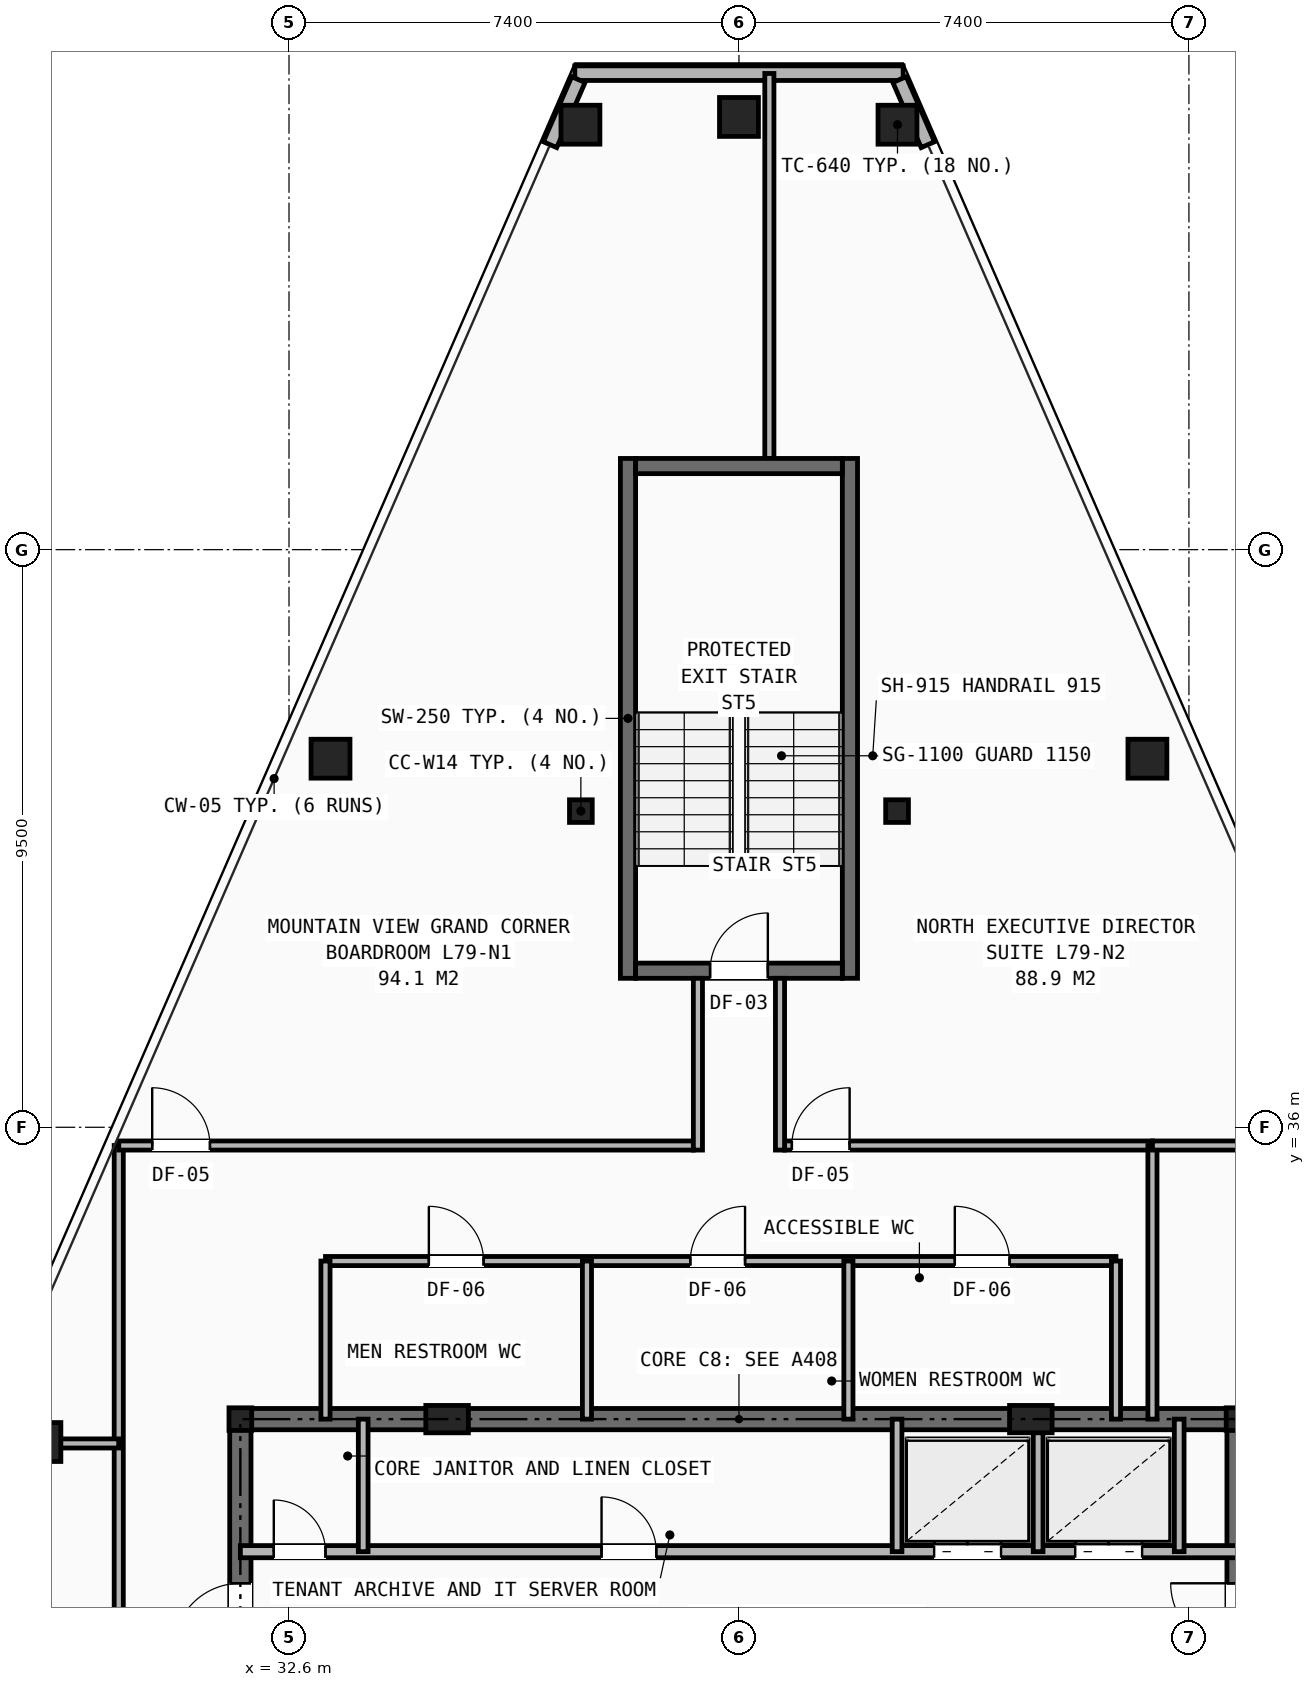
"""IFC4 building model, lengths in metres.
Left out: names, types, materials, properties, quantities, classifications, styles, units other than length and angle.
Written with IfcOpenShell. Run it as: python <this file> out.ifc"""

import sys

from ifc_helpers import new_model, si_unit, direction, frame, frame_2d, origin, origin_2d, place, context, subcontext, project, spatial, rectangle, hollow_rectangle, i_section, extrude, element, fill, save


model = new_model("IFC4")
c1 = context("Model", 3, precision=1e-05, world=origin(), true_north=direction((0.0, 1.0)))
c2 = subcontext(c1, "Body", "Model", "MODEL_VIEW")
j1 = project(units=[si_unit("LENGTHUNIT", "METRE"), si_unit("PLANEANGLEUNIT", "RADIAN")], contexts=[c1])
p1 = place(None, origin())
s1 = spatial("IfcSite", under=j1, at=p1, CompositionType="ELEMENT")
p2 = place(p1, origin())
s2 = spatial("IfcBuilding", under=s1, at=p2, CompositionType="ELEMENT")
p3 = place(p2, frame((0.0, 0.0, 279.5)))
s3 = spatial("IfcBuildingStorey", under=s2, at=p3, CompositionType="ELEMENT", Elevation=279.5)
for number, where, z_axis, x_axis in (
    (1, (31.8, 31.2, 0.0), (0.0, 0.0, 1.0), (1.0, 0.0, 0.0)),
    (2, (48.2, 31.2, 0.0), (0.0, 0.0, 1.0), (1.0, 0.0, 0.0)),
    (3, (37.4, 41.2, 0.0), (0.0, 0.0, 1.0), (1.0, 0.0, 0.0)),
    (4, (42.6, 41.2, 0.0), (0.0, 0.0, 1.0), (1.0, 0.0, 0.0)),
):
    element("IfcColumn", number, at=place(p3, frame(where, z_axis=z_axis, x_axis=x_axis)), inside=s3, PredefinedType="COLUMN", context=c2, shape_type="SweptSolid", body=[
        extrude(i_section(OverallWidth=0.374, OverallDepth=0.372, WebThickness=0.016, FlangeThickness=0.026, at=origin_2d()), origin(), (0.0, 0.0, 1.0), 3.5),
    ])
for number, where, z_axis, x_axis in (
    (5, (35.2, 31.2, 0.0), (0.0, 0.0, 1.0), (1.0, 0.0, 0.0)),
    (6, (44.8, 31.2, 0.0), (0.0, 0.0, 1.0), (1.0, 0.0, 0.0)),
):
    element("IfcColumn", number, at=place(p3, frame(where, z_axis=z_axis, x_axis=x_axis)), inside=s3, PredefinedType="PILASTER", context=c2, shape_type="SweptSolid", body=[
        extrude(rectangle(XDim=0.7, YDim=0.45, at=origin_2d()), origin(), (0.0, 0.0, 1.0), 3.5),
    ])
for number, where, z_axis, x_axis in (
    (7, (42.607, 52.489, 0.0), (0.0, 0.0, 1.0), (1.0, 0.0, 0.0)),
    (8, (40.0, 52.617, 0.0), (0.0, 0.0, 1.0), (1.0, 0.0, 0.0)),
    (9, (37.393, 52.489, 0.0), (0.0, 0.0, 1.0), (1.0, 0.0, 0.0)),
    (10, (33.283, 42.062, 0.0), (0.0, 0.0, 1.0), (1.0, 0.0, 0.0)),
    (11, (28.528, 30.823, 0.0), (0.0, 0.0, 1.0), (1.0, 0.0, 0.0)),
    (12, (46.717, 42.062, 0.0), (0.0, 0.0, 1.0), (1.0, 0.0, 0.0)),
):
    element("IfcColumn", number, at=place(p3, frame(where, z_axis=z_axis, x_axis=x_axis)), inside=s3, PredefinedType="COLUMN", context=c2, shape_type="SweptSolid", body=[
        extrude(hollow_rectangle(XDim=0.64, YDim=0.64, WallThickness=0.045, at=origin_2d()), origin(), (0.0, 0.0, 1.0), 3.5),
    ])
p4 = place(p3, frame((37.3, 53.337, 0.0), z_axis=(0.0, 0.0, 1.0), x_axis=(1.0, 0.0, 0.0)))
e13 = element("IfcWall", 13, at=p4, inside=s3, PredefinedType="SHEAR", context=c2, shape_type="SweptSolid", body=[
    extrude(rectangle(XDim=5.4, YDim=0.24, at=frame_2d((2.7, 0.0))), origin(), (0.0, 0.0, 1.0), 2.623),
])
for number, where, z_axis, x_axis in (
    (14, (37.359, 53.231, 0.0), (0.0, 0.0, 1.0), (-0.399, -0.917, 0.0)),
    (15, (43.107, 52.161, 0.0), (0.0, 0.0, 1.0), (-0.399, 0.917, 0.0)),
):
    element("IfcWall", number, at=place(p3, frame(where, z_axis=z_axis, x_axis=x_axis)), inside=s3, PredefinedType="SHEAR", context=c2, shape_type="SweptSolid", body=[
        extrude(rectangle(XDim=1.167, YDim=0.24, at=frame_2d((0.584, 0.0))), origin(), (0.0, 0.0, 1.0), 2.623),
    ])
p5 = place(p3, frame((31.8, 31.2, 0.0), z_axis=(0.0, 0.0, 1.0), x_axis=(1.0, 0.0, 0.0)))
e16 = element("IfcWall", 16, at=p5, inside=s3, PredefinedType="SHEAR", context=c2, shape_type="SweptSolid", body=[
    extrude(rectangle(XDim=16.4, YDim=0.35, at=frame_2d((8.2, 0.0))), origin(), (0.0, 0.0, 1.0), 3.25),
])
p6 = place(p3, frame((31.8, 16.4, 0.0), z_axis=(0.0, 0.0, 1.0), x_axis=(0.0, 1.0, 0.0)))
e17 = element("IfcWall", 17, at=p6, inside=s3, PredefinedType="SHEAR", context=c2, shape_type="SweptSolid", body=[
    extrude(rectangle(XDim=14.8, YDim=0.35, at=frame_2d((7.4, 0.0))), origin(), (0.0, 0.0, 1.0), 3.25),
])
p7 = place(p6, frame((11.0, 0.0, 0.0)))
e18 = element("IfcOpeningElement", 18, at=p7, cuts=e17, PredefinedType="OPENING", context=c2, shape_type="SweptSolid", body=[
    extrude(rectangle(XDim=1.1, YDim=2.15, at=frame_2d((0.55, 1.075))), frame((0.0, 0.185, 0.0), z_axis=(0.0, -1.0, 0.0), x_axis=(1.0, 0.0, 0.0)), (0.0, 0.0, 1.0), 0.37),
])
p8 = place(p3, frame((48.2, 16.4, 0.0), z_axis=(0.0, 0.0, 1.0), x_axis=(0.0, 1.0, 0.0)))
e19 = element("IfcWall", 19, at=p8, inside=s3, PredefinedType="SHEAR", context=c2, shape_type="SweptSolid", body=[
    extrude(rectangle(XDim=14.8, YDim=0.35, at=frame_2d((7.4, 0.0))), origin(), (0.0, 0.0, 1.0), 3.25),
])
p9 = place(p8, frame((11.0, 0.0, 0.0)))
e20 = element("IfcOpeningElement", 20, at=p9, cuts=e19, PredefinedType="OPENING", context=c2, shape_type="SweptSolid", body=[
    extrude(rectangle(XDim=1.1, YDim=2.15, at=frame_2d((0.55, 1.075))), frame((0.0, 0.185, 0.0), z_axis=(0.0, -1.0, 0.0), x_axis=(1.0, 0.0, 0.0)), (0.0, 0.0, 1.0), 0.37),
])
p10 = place(p3, frame((31.8, 29.02, 0.0), z_axis=(0.0, 0.0, 1.0), x_axis=(1.0, 0.0, 0.0)))
e21 = element("IfcWall", 21, at=p10, inside=s3, PredefinedType="SOLIDWALL", context=c2, shape_type="SweptSolid", body=[
    extrude(rectangle(XDim=16.4, YDim=0.2, at=frame_2d((8.2, 0.0))), origin(), (0.0, 0.0, 1.0), 2.705),
])
p11 = place(p10, frame((0.55, 0.0, 0.0)))
e22 = element("IfcOpeningElement", 22, at=p11, cuts=e21, PredefinedType="OPENING", context=c2, shape_type="SweptSolid", body=[
    extrude(rectangle(XDim=0.85, YDim=2.05, at=frame_2d((0.425, 1.025))), frame((0.0, 0.11, 0.0), z_axis=(0.0, -1.0, 0.0), x_axis=(1.0, 0.0, 0.0)), (0.0, 0.0, 1.0), 0.22),
])
p12 = place(p10, frame((5.94, 0.0, 0.0)))
e23 = element("IfcOpeningElement", 23, at=p12, cuts=e21, PredefinedType="OPENING", context=c2, shape_type="SweptSolid", body=[
    extrude(rectangle(XDim=0.9, YDim=2.1, at=frame_2d((0.45, 1.05))), frame((0.0, 0.11, 0.0), z_axis=(0.0, -1.0, 0.0), x_axis=(1.0, 0.0, 0.0)), (0.0, 0.0, 1.0), 0.22),
])
p13 = place(p10, frame((11.41, 0.0, 0.0)))
e24 = element("IfcOpeningElement", 24, at=p13, cuts=e21, PredefinedType="OPENING", context=c2, shape_type="SweptSolid", body=[
    extrude(rectangle(XDim=1.1, YDim=2.15, at=frame_2d((0.55, 1.075))), frame((0.0, 0.11, 0.0), z_axis=(0.0, -1.0, 0.0), x_axis=(1.0, 0.0, 0.0)), (0.0, 0.0, 1.0), 0.22),
])
p14 = place(p10, frame((13.73, 0.0, 0.0)))
e25 = element("IfcOpeningElement", 25, at=p14, cuts=e21, PredefinedType="OPENING", context=c2, shape_type="SweptSolid", body=[
    extrude(rectangle(XDim=1.1, YDim=2.15, at=frame_2d((0.55, 1.075))), frame((0.0, 0.11, 0.0), z_axis=(0.0, -1.0, 0.0), x_axis=(1.0, 0.0, 0.0)), (0.0, 0.0, 1.0), 0.22),
])
for number, where, z_axis, x_axis in (
    (26, (33.82, 29.02, 0.0), (0.0, 0.0, 1.0), (0.0, 1.0, 0.0)),
    (27, (42.6, 29.02, 0.0), (0.0, 0.0, 1.0), (0.0, 1.0, 0.0)),
    (28, (44.92, 29.02, 0.0), (0.0, 0.0, 1.0), (0.0, 1.0, 0.0)),
    (29, (47.24, 29.02, 0.0), (0.0, 0.0, 1.0), (0.0, 1.0, 0.0)),
):
    element("IfcWall", number, at=place(p3, frame(where, z_axis=z_axis, x_axis=x_axis)), inside=s3, PredefinedType="SOLIDWALL", context=c2, shape_type="SweptSolid", body=[
        extrude(rectangle(XDim=2.18, YDim=0.16, at=frame_2d((1.09, 0.0))), origin(), (0.0, 0.0, 1.0), 2.705),
    ])
p15 = place(p3, frame((33.2, 33.8, 0.0), z_axis=(0.0, 0.0, 1.0), x_axis=(1.0, 0.0, 0.0)))
e30 = element("IfcWall", 30, at=p15, inside=s3, PredefinedType="PARTITIONING", context=c2, shape_type="SweptSolid", body=[
    extrude(rectangle(XDim=13.0, YDim=0.15, at=frame_2d((6.5, 0.0))), origin(), (0.0, 0.0, 1.0), 3.25),
])
p16 = place(p15, frame((1.7, 0.0, 0.0)))
e31 = element("IfcOpeningElement", 31, at=p16, cuts=e30, PredefinedType="OPENING", context=c2, shape_type="SweptSolid", body=[
    extrude(rectangle(XDim=0.9, YDim=2.1, at=frame_2d((0.45, 1.05))), frame((0.0, 0.085, 0.0), z_axis=(0.0, -1.0, 0.0), x_axis=(1.0, 0.0, 0.0)), (0.0, 0.0, 1.0), 0.17),
])
p17 = place(p15, frame((6.0, 0.0, 0.0)))
e32 = element("IfcOpeningElement", 32, at=p17, cuts=e30, PredefinedType="OPENING", context=c2, shape_type="SweptSolid", body=[
    extrude(rectangle(XDim=0.9, YDim=2.1, at=frame_2d((0.45, 1.05))), frame((0.0, 0.085, 0.0), z_axis=(0.0, -1.0, 0.0), x_axis=(1.0, 0.0, 0.0)), (0.0, 0.0, 1.0), 0.17),
])
p18 = place(p15, frame((10.35, 0.0, 0.0)))
e33 = element("IfcOpeningElement", 33, at=p18, cuts=e30, PredefinedType="OPENING", context=c2, shape_type="SweptSolid", body=[
    extrude(rectangle(XDim=0.9, YDim=2.1, at=frame_2d((0.45, 1.05))), frame((0.0, 0.085, 0.0), z_axis=(0.0, -1.0, 0.0), x_axis=(1.0, 0.0, 0.0)), (0.0, 0.0, 1.0), 0.17),
])
for number, where, z_axis, x_axis in (
    (34, (33.2, 31.2, 0.0), (0.0, 0.0, 1.0), (0.0, 1.0, 0.0)),
    (35, (46.2, 31.2, 0.0), (0.0, 0.0, 1.0), (0.0, 1.0, 0.0)),
    (36, (37.5, 31.2, 0.0), (0.0, 0.0, 1.0), (0.0, 1.0, 0.0)),
    (37, (41.8, 31.2, 0.0), (0.0, 0.0, 1.0), (0.0, 1.0, 0.0)),
):
    element("IfcWall", number, at=place(p3, frame(where, z_axis=z_axis, x_axis=x_axis)), inside=s3, PredefinedType="PARTITIONING", context=c2, shape_type="SweptSolid", body=[
        extrude(rectangle(XDim=2.6, YDim=0.15, at=frame_2d((1.3, 0.0))), origin(), (0.0, 0.0, 1.0), 2.705),
    ])
p19 = place(p3, frame((29.8, 16.4, 0.0), z_axis=(0.0, 0.0, 1.0), x_axis=(0.0, 1.0, 0.0)))
e38 = element("IfcWall", 38, at=p19, inside=s3, PredefinedType="PARTITIONING", context=c2, shape_type="SweptSolid", body=[
    extrude(rectangle(XDim=19.3, YDim=0.15, at=frame_2d((9.65, 0.0))), origin(), (0.0, 0.0, 1.0), 2.292),
])
p20 = place(p19, frame((0.35, 0.0, 0.0)))
e39 = element("IfcOpeningElement", 39, at=p20, cuts=e38, PredefinedType="OPENING", context=c2, shape_type="SweptSolid", body=[
    extrude(rectangle(XDim=0.95, YDim=2.1, at=frame_2d((0.475, 1.05))), frame((0.0, 0.085, 0.0), z_axis=(0.0, -1.0, 0.0), x_axis=(1.0, 0.0, 0.0)), (0.0, 0.0, 1.0), 0.17),
])
p21 = place(p19, frame((4.15, 0.0, 0.0)))
e40 = element("IfcOpeningElement", 40, at=p21, cuts=e38, PredefinedType="OPENING", context=c2, shape_type="SweptSolid", body=[
    extrude(rectangle(XDim=0.95, YDim=2.1, at=frame_2d((0.475, 1.05))), frame((0.0, 0.085, 0.0), z_axis=(0.0, -1.0, 0.0), x_axis=(1.0, 0.0, 0.0)), (0.0, 0.0, 1.0), 0.17),
])
p22 = place(p19, frame((9.45, 0.0, 0.0)))
e41 = element("IfcOpeningElement", 41, at=p22, cuts=e38, PredefinedType="OPENING", context=c2, shape_type="SweptSolid", body=[
    extrude(rectangle(XDim=0.95, YDim=2.1, at=frame_2d((0.475, 1.05))), frame((0.0, 0.085, 0.0), z_axis=(0.0, -1.0, 0.0), x_axis=(1.0, 0.0, 0.0)), (0.0, 0.0, 1.0), 0.17),
])
p23 = place(p3, frame((29.8, 35.7, 0.0), z_axis=(0.0, 0.0, 1.0), x_axis=(1.0, 0.0, 0.0)))
e42 = element("IfcWall", 42, at=p23, inside=s3, PredefinedType="PARTITIONING", context=c2, shape_type="SweptSolid", body=[
    extrude(rectangle(XDim=9.45, YDim=0.15, at=frame_2d((4.725, 0.0))), origin(), (0.0, 0.0, 1.0), 2.628),
])
p24 = place(p23, frame((0.55, 0.0, 0.0)))
e43 = element("IfcOpeningElement", 43, at=p24, cuts=e42, PredefinedType="OPENING", context=c2, shape_type="SweptSolid", body=[
    extrude(rectangle(XDim=0.95, YDim=2.1, at=frame_2d((0.475, 1.05))), frame((0.0, 0.085, 0.0), z_axis=(0.0, -1.0, 0.0), x_axis=(1.0, 0.0, 0.0)), (0.0, 0.0, 1.0), 0.17),
])
p25 = place(p3, frame((40.75, 35.7, 0.0), z_axis=(0.0, 0.0, 1.0), x_axis=(1.0, 0.0, 0.0)))
e44 = element("IfcWall", 44, at=p25, inside=s3, PredefinedType="PARTITIONING", context=c2, shape_type="SweptSolid", body=[
    extrude(rectangle(XDim=6.05, YDim=0.15, at=frame_2d((3.025, 0.0))), origin(), (0.0, 0.0, 1.0), 3.25),
])
p26 = place(p25, frame((0.12, 0.0, 0.0)))
e45 = element("IfcOpeningElement", 45, at=p26, cuts=e44, PredefinedType="OPENING", context=c2, shape_type="SweptSolid", body=[
    extrude(rectangle(XDim=0.95, YDim=2.1, at=frame_2d((0.475, 1.05))), frame((0.0, 0.085, 0.0), z_axis=(0.0, -1.0, 0.0), x_axis=(1.0, 0.0, 0.0)), (0.0, 0.0, 1.0), 0.17),
])
p27 = place(p3, frame((46.8, 31.2, 0.0), z_axis=(0.0, 0.0, 1.0), x_axis=(0.0, 1.0, 0.0)))
e46 = element("IfcWall", 46, at=p27, inside=s3, PredefinedType="PARTITIONING", context=c2, shape_type="SweptSolid", body=[
    extrude(rectangle(XDim=4.5, YDim=0.15, at=frame_2d((2.25, 0.0))), origin(), (0.0, 0.0, 1.0), 2.705),
])
p28 = place(p3, frame((27.466, 30.8, 0.0), z_axis=(0.0, 0.0, 1.0), x_axis=(1.0, 0.0, 0.0)))
e47 = element("IfcWall", 47, at=p28, inside=s3, PredefinedType="PARTITIONING", context=c2, shape_type="SweptSolid", body=[
    extrude(rectangle(XDim=2.334, YDim=0.15, at=frame_2d((1.167, 0.0))), origin(), (0.0, 0.0, 1.0), 2.292),
])
p29 = place(p3, frame((46.8, 35.7, 0.0), z_axis=(0.0, 0.0, 1.0), x_axis=(1.0, 0.0, 0.0)))
e48 = element("IfcWall", 48, at=p29, inside=s3, PredefinedType="PARTITIONING", context=c2, shape_type="SweptSolid", body=[
    extrude(rectangle(XDim=3.466, YDim=0.15, at=frame_2d((1.733, 0.0))), origin(), (0.0, 0.0, 1.0), 2.628),
])
p30 = place(p3, frame((40.5, 47.0, 0.0), z_axis=(0.0, 0.0, 1.0), x_axis=(0.0, 1.0, 0.0)))
e49 = element("IfcWall", 49, at=p30, inside=s3, PredefinedType="PARTITIONING", context=c2, shape_type="SweptSolid", body=[
    extrude(rectangle(XDim=6.332, YDim=0.15, at=frame_2d((3.166, 0.0))), origin(), (0.0, 0.0, 1.0), 2.628),
])
for number, where, z_axis, x_axis in (
    (50, (38.175, 38.45, 0.0), (0.0, 0.0, 1.0), (0.0, 1.0, 0.0)),
    (51, (41.825, 38.45, 0.0), (0.0, 0.0, 1.0), (0.0, 1.0, 0.0)),
):
    element("IfcWall", number, at=place(p3, frame(where, z_axis=z_axis, x_axis=x_axis)), inside=s3, PredefinedType="SHEAR", context=c2, shape_type="SweptSolid", body=[
        extrude(rectangle(XDim=8.55, YDim=0.25, at=frame_2d((4.275, 0.0))), origin(), (0.0, 0.0, 1.0), 3.25),
    ])
p31 = place(p3, frame((38.3, 38.575, 0.0), z_axis=(0.0, 0.0, 1.0), x_axis=(1.0, 0.0, 0.0)))
e52 = element("IfcWall", 52, at=p31, inside=s3, PredefinedType="SHEAR", context=c2, shape_type="SweptSolid", body=[
    extrude(rectangle(XDim=3.4, YDim=0.25, at=frame_2d((1.7, 0.0))), origin(), (0.0, 0.0, 1.0), 3.25),
])
p32 = place(p31, frame((1.225, 0.0, 0.0)))
e53 = element("IfcOpeningElement", 53, at=p32, cuts=e52, PredefinedType="OPENING", context=c2, shape_type="SweptSolid", body=[
    extrude(rectangle(XDim=0.95, YDim=2.1, at=frame_2d((0.475, 1.05))), frame((0.0, 0.135, 0.0), z_axis=(0.0, -1.0, 0.0), x_axis=(1.0, 0.0, 0.0)), (0.0, 0.0, 1.0), 0.27),
])
p33 = place(p3, frame((38.3, 46.875, 0.0), z_axis=(0.0, 0.0, 1.0), x_axis=(1.0, 0.0, 0.0)))
e54 = element("IfcWall", 54, at=p33, inside=s3, PredefinedType="SHEAR", context=c2, shape_type="SweptSolid", body=[
    extrude(rectangle(XDim=3.4, YDim=0.25, at=frame_2d((1.7, 0.0))), origin(), (0.0, 0.0, 1.0), 3.25),
])
for number, where, z_axis, x_axis in (
    (55, (39.325, 35.625, 0.0), (0.0, 0.0, 1.0), (0.0, 1.0, 0.0)),
    (56, (40.675, 35.625, 0.0), (0.0, 0.0, 1.0), (0.0, 1.0, 0.0)),
):
    element("IfcWall", number, at=place(p3, frame(where, z_axis=z_axis, x_axis=x_axis)), inside=s3, PredefinedType="PARTITIONING", context=c2, shape_type="SweptSolid", body=[
        extrude(rectangle(XDim=2.825, YDim=0.15, at=frame_2d((1.413, 0.0))), origin(), (0.0, 0.0, 1.0), 3.25),
    ])
p34 = place(p11, origin())
e57 = element("IfcDoor", 57, at=p34, inside=s3, OperationType="SINGLE_SWING_LEFT", PredefinedType="DOOR", context=c2, shape_type="SweptSolid", body=[
    extrude(rectangle(XDim=0.85, YDim=2.05, at=frame_2d((0.425, 1.025))), frame((0.0, 0.025, 0.0), z_axis=(0.0, -1.0, 0.0), x_axis=(1.0, 0.0, 0.0)), (0.0, 0.0, 1.0), 0.05),
])
fill(e22, e57)
p35 = place(p7, origin())
e58 = element("IfcDoor", 58, at=p35, inside=s3, OperationType="SINGLE_SWING_LEFT", PredefinedType="DOOR", context=c2, shape_type="SweptSolid", body=[
    extrude(rectangle(XDim=1.1, YDim=2.15, at=frame_2d((0.55, 1.075))), frame((0.0, 0.025, 0.0), z_axis=(0.0, -1.0, 0.0), x_axis=(1.0, 0.0, 0.0)), (0.0, 0.0, 1.0), 0.05),
])
fill(e18, e58)
p36 = place(p12, origin())
e59 = element("IfcDoor", 59, at=p36, inside=s3, OperationType="SINGLE_SWING_LEFT", PredefinedType="DOOR", context=c2, shape_type="SweptSolid", body=[
    extrude(rectangle(XDim=0.9, YDim=2.1, at=frame_2d((0.45, 1.05))), frame((0.0, 0.025, 0.0), z_axis=(0.0, -1.0, 0.0), x_axis=(1.0, 0.0, 0.0)), (0.0, 0.0, 1.0), 0.05),
])
fill(e23, e59)
p37 = place(p13, origin())
e60 = element("IfcDoor", 60, at=p37, inside=s3, OperationType="DOUBLE_DOOR_SLIDING", PredefinedType="DOOR", context=c2, shape_type="SweptSolid", body=[
    extrude(rectangle(XDim=1.1, YDim=2.15, at=frame_2d((0.55, 1.075))), frame((0.0, 0.025, 0.0), z_axis=(0.0, -1.0, 0.0), x_axis=(1.0, 0.0, 0.0)), (0.0, 0.0, 1.0), 0.05),
])
fill(e24, e60)
p38 = place(p14, origin())
e61 = element("IfcDoor", 61, at=p38, inside=s3, OperationType="DOUBLE_DOOR_SLIDING", PredefinedType="DOOR", context=c2, shape_type="SweptSolid", body=[
    extrude(rectangle(XDim=1.1, YDim=2.15, at=frame_2d((0.55, 1.075))), frame((0.0, 0.025, 0.0), z_axis=(0.0, -1.0, 0.0), x_axis=(1.0, 0.0, 0.0)), (0.0, 0.0, 1.0), 0.05),
])
fill(e25, e61)
p39 = place(p16, origin())
e62 = element("IfcDoor", 62, at=p39, inside=s3, OperationType="SINGLE_SWING_LEFT", PredefinedType="DOOR", context=c2, shape_type="SweptSolid", body=[
    extrude(rectangle(XDim=0.9, YDim=2.1, at=frame_2d((0.45, 1.05))), frame((0.0, 0.025, 0.0), z_axis=(0.0, -1.0, 0.0), x_axis=(1.0, 0.0, 0.0)), (0.0, 0.0, 1.0), 0.05),
])
fill(e31, e62)
p40 = place(p17, origin())
e63 = element("IfcDoor", 63, at=p40, inside=s3, OperationType="SINGLE_SWING_RIGHT", PredefinedType="DOOR", context=c2, shape_type="SweptSolid", body=[
    extrude(rectangle(XDim=0.9, YDim=2.1, at=frame_2d((0.45, 1.05))), frame((0.0, 0.025, 0.0), z_axis=(0.0, -1.0, 0.0), x_axis=(1.0, 0.0, 0.0)), (0.0, 0.0, 1.0), 0.05),
])
fill(e32, e63)
p41 = place(p18, origin())
e64 = element("IfcDoor", 64, at=p41, inside=s3, OperationType="SINGLE_SWING_LEFT", PredefinedType="DOOR", context=c2, shape_type="SweptSolid", body=[
    extrude(rectangle(XDim=0.9, YDim=2.1, at=frame_2d((0.45, 1.05))), frame((0.0, 0.025, 0.0), z_axis=(0.0, -1.0, 0.0), x_axis=(1.0, 0.0, 0.0)), (0.0, 0.0, 1.0), 0.05),
])
fill(e33, e64)
p42 = place(p24, origin())
e65 = element("IfcDoor", 65, at=p42, inside=s3, OperationType="SINGLE_SWING_LEFT", PredefinedType="DOOR", context=c2, shape_type="SweptSolid", body=[
    extrude(rectangle(XDim=0.95, YDim=2.1, at=frame_2d((0.475, 1.05))), frame((0.0, 0.025, 0.0), z_axis=(0.0, -1.0, 0.0), x_axis=(1.0, 0.0, 0.0)), (0.0, 0.0, 1.0), 0.05),
])
fill(e43, e65)
p43 = place(p26, origin())
e66 = element("IfcDoor", 66, at=p43, inside=s3, OperationType="SINGLE_SWING_RIGHT", PredefinedType="DOOR", context=c2, shape_type="SweptSolid", body=[
    extrude(rectangle(XDim=0.95, YDim=2.1, at=frame_2d((0.475, 1.05))), frame((0.0, 0.025, 0.0), z_axis=(0.0, -1.0, 0.0), x_axis=(1.0, 0.0, 0.0)), (0.0, 0.0, 1.0), 0.05),
])
fill(e45, e66)
p44 = place(p32, origin())
e67 = element("IfcDoor", 67, at=p44, inside=s3, OperationType="SINGLE_SWING_RIGHT", PredefinedType="DOOR", context=c2, shape_type="SweptSolid", body=[
    extrude(rectangle(XDim=0.95, YDim=2.1, at=frame_2d((0.475, 1.05))), frame((0.0, 0.025, 0.0), z_axis=(0.0, -1.0, 0.0), x_axis=(1.0, 0.0, 0.0)), (0.0, 0.0, 1.0), 0.05),
])
fill(e53, e67)
save(model, sys.argv[1])
